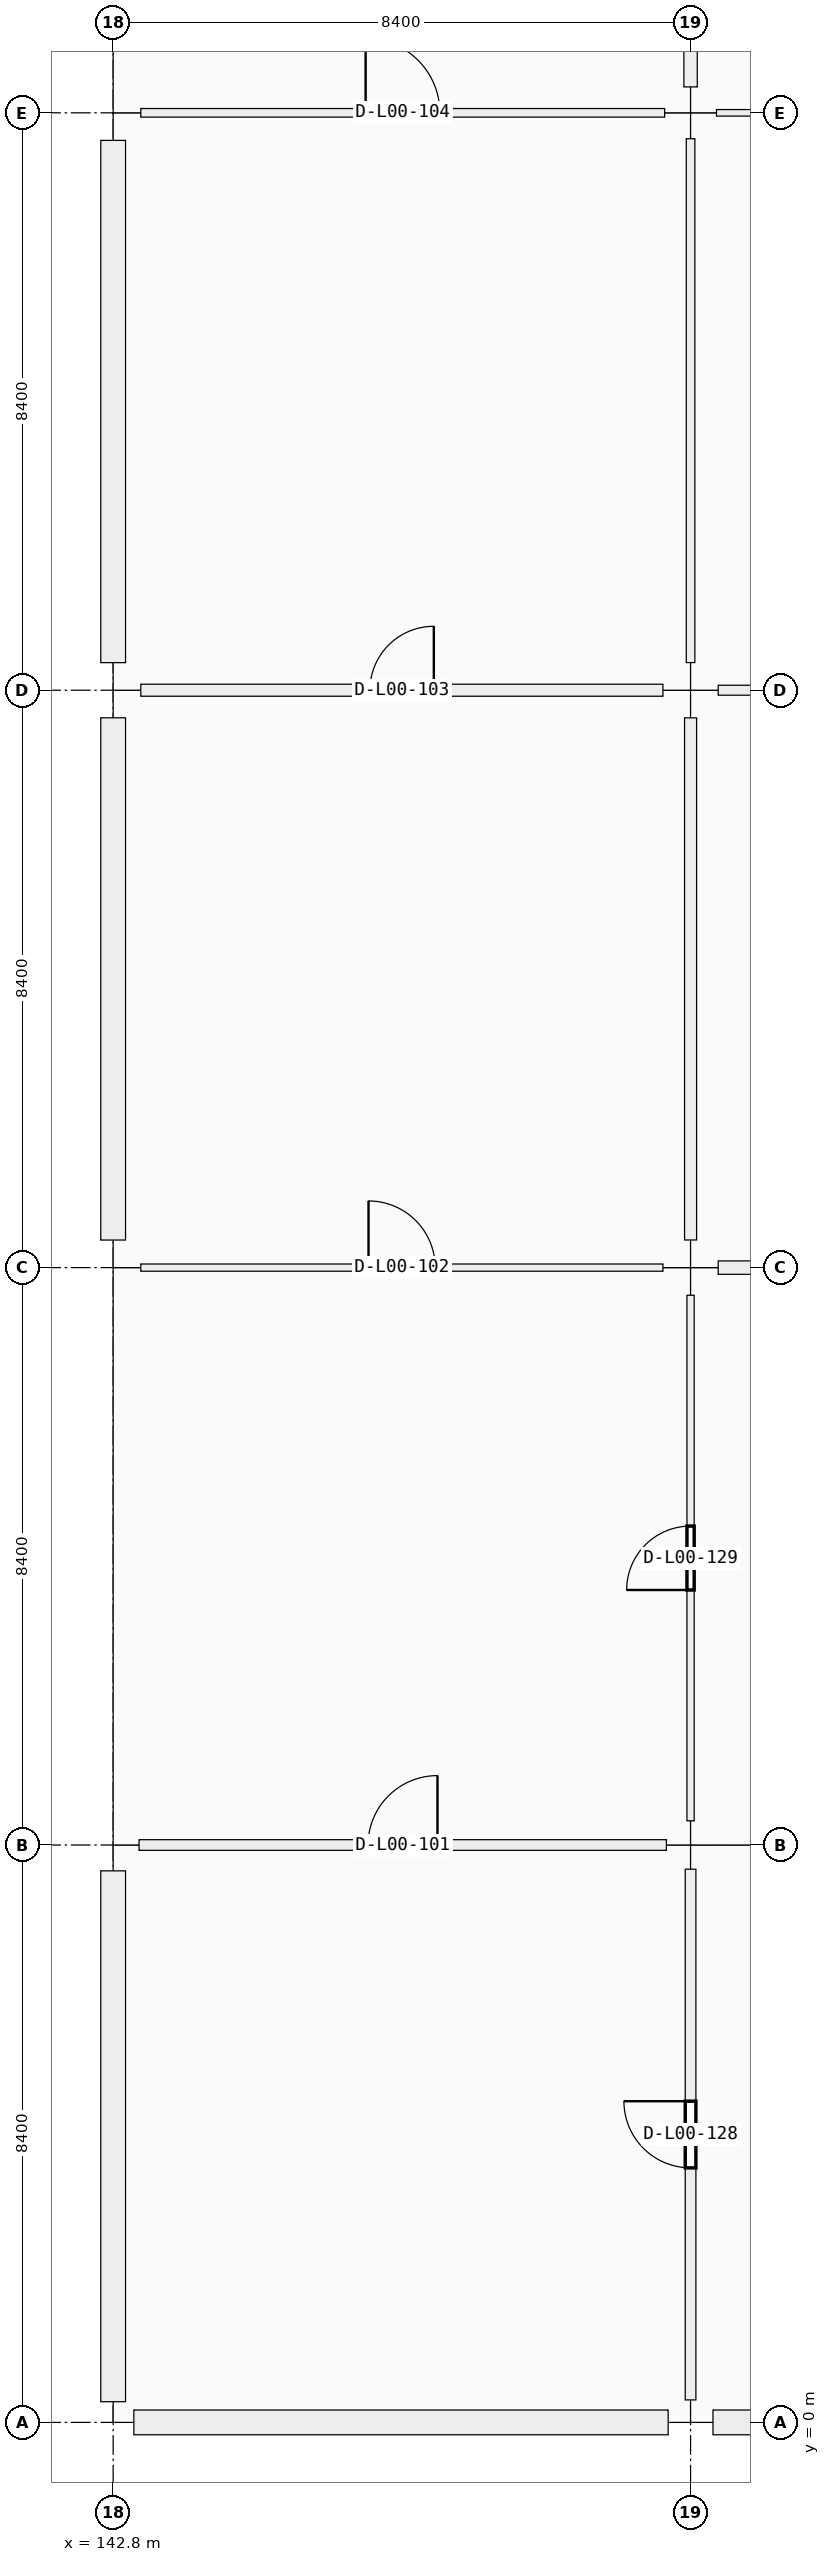
"""IFC4 building model, lengths in metres.
Left out: names, types, materials, properties, quantities, classifications, styles, units other than length and angle.
Written with IfcOpenShell. Run it as: python <this file> out.ifc"""

import sys

from ifc_helpers import new_model, si_unit, direction, frame, frame_2d, origin, origin_2d, place, context, subcontext, project, spatial, rectangle, extrude, element, fill, save


model = new_model("IFC4")
c1 = context("Model", 3, precision=1e-05, world=origin(), true_north=direction((0.0, 1.0)))
c2 = subcontext(c1, "Body", "Model", "MODEL_VIEW")
j1 = project(units=[si_unit("LENGTHUNIT", "METRE"), si_unit("PLANEANGLEUNIT", "RADIAN")], contexts=[c1])
p1 = place(None, origin())
s1 = spatial("IfcSite", under=j1, at=p1, CompositionType="ELEMENT")
p2 = place(p1, origin())
s2 = spatial("IfcBuilding", under=s1, at=p2, CompositionType="ELEMENT")
p3 = place(p2, origin())
s3 = spatial("IfcBuildingStorey", under=s2, at=p3, CompositionType="ELEMENT", Elevation=0.0)
p4 = place(p3, frame((142.8, 0.0, 0.0), z_axis=(0.0, 0.0, 1.0), x_axis=(1.0, 0.0, 0.0)))
e1 = element("IfcColumn", 1, at=p4, inside=s3, PredefinedType="COLUMN", context=c2, shape_type="SweptSolid", body=[
    extrude(rectangle(XDim=0.6, YDim=0.6, at=origin_2d()), origin(), (0.0, 0.0, 1.0), 5.76),
])
p5 = place(p3, frame((142.8, 8.4, 0.0), z_axis=(0.0, 0.0, 1.0), x_axis=(1.0, 0.0, 0.0)))
e2 = element("IfcColumn", 2, at=p5, inside=s3, PredefinedType="COLUMN", context=c2, shape_type="SweptSolid", body=[
    extrude(rectangle(XDim=0.75, YDim=0.75, at=origin_2d()), origin(), (0.0, 0.0, 1.0), 5.76),
])
for number, where, z_axis, x_axis in (
    (3, (142.8, 16.8, 0.0), (0.0, 0.0, 1.0), (1.0, 0.0, 0.0)),
    (4, (142.8, 25.2, 0.0), (0.0, 0.0, 1.0), (1.0, 0.0, 0.0)),
    (5, (142.8, 33.6, 0.0), (0.0, 0.0, 1.0), (1.0, 0.0, 0.0)),
):
    element("IfcColumn", number, at=place(p3, frame(where, z_axis=z_axis, x_axis=x_axis)), inside=s3, PredefinedType="COLUMN", context=c2, shape_type="SweptSolid", body=[
        extrude(rectangle(XDim=0.8, YDim=0.8, at=origin_2d()), origin(), (0.0, 0.0, 1.0), 5.76),
    ])
p6 = place(p3, frame((151.2, 0.0, 0.0), z_axis=(0.0, 0.0, 1.0), x_axis=(1.0, 0.0, 0.0)))
e6 = element("IfcColumn", 6, at=p6, inside=s3, PredefinedType="COLUMN", context=c2, shape_type="SweptSolid", body=[
    extrude(rectangle(XDim=0.65, YDim=0.65, at=origin_2d()), origin(), (0.0, 0.0, 1.0), 5.76),
])
p7 = place(p3, frame((151.2, 8.4, 0.0), z_axis=(0.0, 0.0, 1.0), x_axis=(1.0, 0.0, 0.0)))
e7 = element("IfcColumn", 7, at=p7, inside=s3, PredefinedType="COLUMN", context=c2, shape_type="SweptSolid", body=[
    extrude(rectangle(XDim=0.7, YDim=0.7, at=origin_2d()), origin(), (0.0, 0.0, 1.0), 5.76),
])
for number, where, z_axis, x_axis in (
    (8, (151.2, 16.8, 0.0), (0.0, 0.0, 1.0), (1.0, 0.0, 0.0)),
    (9, (151.2, 25.2, 0.0), (0.0, 0.0, 1.0), (1.0, 0.0, 0.0)),
):
    element("IfcColumn", number, at=place(p3, frame(where, z_axis=z_axis, x_axis=x_axis)), inside=s3, PredefinedType="COLUMN", context=c2, shape_type="SweptSolid", body=[
        extrude(rectangle(XDim=0.8, YDim=0.8, at=origin_2d()), origin(), (0.0, 0.0, 1.0), 5.76),
    ])
p8 = place(p3, frame((151.2, 33.6, 0.0), z_axis=(0.0, 0.0, 1.0), x_axis=(1.0, 0.0, 0.0)))
e10 = element("IfcColumn", 10, at=p8, inside=s3, PredefinedType="COLUMN", context=c2, shape_type="SweptSolid", body=[
    extrude(rectangle(XDim=0.75, YDim=0.75, at=origin_2d()), origin(), (0.0, 0.0, 1.0), 5.51),
])
p9 = place(p3, frame((150.874, 0.0, 0.0), z_axis=(0.0, 0.0, 1.0), x_axis=(-1.0, 0.0, 0.0)))
e11 = element("IfcWall", 11, at=p9, inside=s3, PredefinedType="SOLIDWALL", context=c2, shape_type="SweptSolid", body=[
    extrude(rectangle(XDim=7.773, YDim=0.36, at=frame_2d((3.886, 0.0))), origin(), (0.0, 0.0, 1.0), 4.7),
])
p10 = place(p9, frame((2.712, 0.0, 0.9)))
e12 = element("IfcOpeningElement", 12, at=p10, cuts=e11, PredefinedType="OPENING", context=c2, shape_type="SweptSolid", body=[
    extrude(rectangle(XDim=2.35, YDim=1.6, at=frame_2d((1.175, 0.8))), frame((0.0, 0.18, 0.0), z_axis=(0.0, -1.0, 0.0), x_axis=(1.0, 0.0, 0.0)), (0.0, 0.0, 1.0), 0.36),
])
p11 = place(p3, frame((142.8, 0.301, 0.0), z_axis=(0.0, 0.0, 1.0), x_axis=(0.0, 1.0, 0.0)))
e13 = element("IfcWall", 13, at=p11, inside=s3, PredefinedType="SOLIDWALL", context=c2, shape_type="SweptSolid", body=[
    extrude(rectangle(XDim=7.723, YDim=0.36, at=frame_2d((3.861, 0.0))), origin(), (0.0, 0.0, 1.0), 4.7),
])
p12 = place(p11, frame((2.486, 0.0, 0.9)))
e14 = element("IfcOpeningElement", 14, at=p12, cuts=e13, PredefinedType="OPENING", context=c2, shape_type="SweptSolid", body=[
    extrude(rectangle(XDim=2.75, YDim=1.6, at=frame_2d((1.375, 0.8))), frame((0.0, 0.18, 0.0), z_axis=(0.0, -1.0, 0.0), x_axis=(1.0, 0.0, 0.0)), (0.0, 0.0, 1.0), 0.36),
])
p13 = place(p3, frame((142.8, 17.201, 0.0), z_axis=(0.0, 0.0, 1.0), x_axis=(0.0, 1.0, 0.0)))
e15 = element("IfcWall", 15, at=p13, inside=s3, PredefinedType="SOLIDWALL", context=c2, shape_type="SweptSolid", body=[
    extrude(rectangle(XDim=7.598, YDim=0.36, at=frame_2d((3.799, 0.0))), origin(), (0.0, 0.0, 1.0), 4.7),
])
p14 = place(p13, frame((3.024, 0.0, 0.9)))
e16 = element("IfcOpeningElement", 16, at=p14, cuts=e15, PredefinedType="OPENING", context=c2, shape_type="SweptSolid", body=[
    extrude(rectangle(XDim=1.55, YDim=1.6, at=frame_2d((0.775, 0.8))), frame((0.0, 0.18, 0.0), z_axis=(0.0, -1.0, 0.0), x_axis=(1.0, 0.0, 0.0)), (0.0, 0.0, 1.0), 0.36),
])
p15 = place(p3, frame((142.8, 25.601, 0.0), z_axis=(0.0, 0.0, 1.0), x_axis=(0.0, 1.0, 0.0)))
e17 = element("IfcWall", 17, at=p15, inside=s3, PredefinedType="SOLIDWALL", context=c2, shape_type="SweptSolid", body=[
    extrude(rectangle(XDim=7.598, YDim=0.36, at=frame_2d((3.799, 0.0))), origin(), (0.0, 0.0, 1.0), 4.7),
])
p16 = place(p15, frame((2.774, 0.0, 0.9)))
e18 = element("IfcOpeningElement", 18, at=p16, cuts=e17, PredefinedType="OPENING", context=c2, shape_type="SweptSolid", body=[
    extrude(rectangle(XDim=2.05, YDim=1.45, at=frame_2d((1.025, 0.725))), frame((0.0, 0.18, 0.0), z_axis=(0.0, -1.0, 0.0), x_axis=(1.0, 0.0, 0.0)), (0.0, 0.0, 1.0), 0.36),
])
p17 = place(p3, frame((159.299, 0.0, 0.0), z_axis=(0.0, 0.0, 1.0), x_axis=(-1.0, 0.0, 0.0)))
e19 = element("IfcWall", 19, at=p17, inside=s3, PredefinedType="SOLIDWALL", context=c2, shape_type="SweptSolid", body=[
    extrude(rectangle(XDim=7.773, YDim=0.36, at=frame_2d((3.887, 0.0))), origin(), (0.0, 0.0, 1.0), 4.7),
])
p18 = place(p17, frame((2.736, 0.0, 0.0)))
e20 = element("IfcOpeningElement", 20, at=p18, cuts=e19, PredefinedType="OPENING", context=c2, shape_type="SweptSolid", body=[
    extrude(rectangle(XDim=2.3, YDim=2.3, at=frame_2d((1.15, 1.15))), frame((0.0, 0.18, 0.0), z_axis=(0.0, -1.0, 0.0), x_axis=(1.0, 0.0, 0.0)), (0.0, 0.0, 1.0), 0.36),
])
p19 = place(p3, frame((143.177, 8.4, 0.0), z_axis=(0.0, 0.0, 1.0), x_axis=(1.0, 0.0, 0.0)))
e21 = element("IfcWall", 21, at=p19, inside=s3, PredefinedType="PARTITIONING", context=c2, shape_type="SweptSolid", body=[
    extrude(rectangle(XDim=7.671, YDim=0.155, at=frame_2d((3.835, 0.0))), origin(), (0.0, 0.0, 1.0), 3.66),
])
p20 = place(p19, frame((3.331, 0.0, 0.0)))
e22 = element("IfcOpeningElement", 22, at=p20, cuts=e21, PredefinedType="OPENING", context=c2, shape_type="SweptSolid", body=[
    extrude(rectangle(XDim=1.01, YDim=2.12, at=frame_2d((0.505, 1.06))), frame((0.0, 0.078, 0.0), z_axis=(0.0, -1.0, 0.0), x_axis=(1.0, 0.0, 0.0)), (0.0, 0.0, 1.0), 0.155),
])
p21 = place(p3, frame((143.202, 16.8, 0.0), z_axis=(0.0, 0.0, 1.0), x_axis=(1.0, 0.0, 0.0)))
e23 = element("IfcWall", 23, at=p21, inside=s3, PredefinedType="PARTITIONING", context=c2, shape_type="SweptSolid", body=[
    extrude(rectangle(XDim=7.596, YDim=0.105, at=frame_2d((3.798, 0.0))), origin(), (0.0, 0.0, 1.0), 3.66),
])
p22 = place(p21, frame((3.313, 0.0, 0.0)))
e24 = element("IfcOpeningElement", 24, at=p22, cuts=e23, PredefinedType="OPENING", context=c2, shape_type="SweptSolid", body=[
    extrude(rectangle(XDim=0.97, YDim=2.12, at=frame_2d((0.485, 1.06))), frame((0.0, 0.052, 0.0), z_axis=(0.0, -1.0, 0.0), x_axis=(1.0, 0.0, 0.0)), (0.0, 0.0, 1.0), 0.105),
])
p23 = place(p3, frame((143.202, 25.2, 0.0), z_axis=(0.0, 0.0, 1.0), x_axis=(1.0, 0.0, 0.0)))
e25 = element("IfcWall", 25, at=p23, inside=s3, PredefinedType="PARTITIONING", context=c2, shape_type="SweptSolid", body=[
    extrude(rectangle(XDim=7.596, YDim=0.175, at=frame_2d((3.798, 0.0))), origin(), (0.0, 0.0, 1.0), 3.66),
])
p24 = place(p23, frame((3.333, 0.0, 0.0)))
e26 = element("IfcOpeningElement", 26, at=p24, cuts=e25, PredefinedType="OPENING", context=c2, shape_type="SweptSolid", body=[
    extrude(rectangle(XDim=0.93, YDim=2.12, at=frame_2d((0.465, 1.06))), frame((0.0, 0.087, 0.0), z_axis=(0.0, -1.0, 0.0), x_axis=(1.0, 0.0, 0.0)), (0.0, 0.0, 1.0), 0.175),
])
p25 = place(p3, frame((143.202, 33.6, 0.0), z_axis=(0.0, 0.0, 1.0), x_axis=(1.0, 0.0, 0.0)))
e27 = element("IfcWall", 27, at=p25, inside=s3, PredefinedType="PARTITIONING", context=c2, shape_type="SweptSolid", body=[
    extrude(rectangle(XDim=7.621, YDim=0.125, at=frame_2d((3.811, 0.0))), origin(), (0.0, 0.0, 1.0), 3.66),
])
p26 = place(p25, frame((3.271, 0.0, 0.0)))
e28 = element("IfcOpeningElement", 28, at=p26, cuts=e27, PredefinedType="OPENING", context=c2, shape_type="SweptSolid", body=[
    extrude(rectangle(XDim=1.08, YDim=2.25, at=frame_2d((0.54, 1.125))), frame((0.0, 0.062, 0.0), z_axis=(0.0, -1.0, 0.0), x_axis=(1.0, 0.0, 0.0)), (0.0, 0.0, 1.0), 0.125),
])
p27 = place(p3, frame((151.602, 16.8, 0.0), z_axis=(0.0, 0.0, 1.0), x_axis=(1.0, 0.0, 0.0)))
e29 = element("IfcWall", 29, at=p27, inside=s3, PredefinedType="PARTITIONING", context=c2, shape_type="SweptSolid", body=[
    extrude(rectangle(XDim=7.596, YDim=0.195, at=frame_2d((3.798, 0.0))), origin(), (0.0, 0.0, 1.0), 3.66),
])
p28 = place(p27, frame((3.288, 0.0, 0.0)))
e30 = element("IfcOpeningElement", 30, at=p28, cuts=e29, PredefinedType="OPENING", context=c2, shape_type="SweptSolid", body=[
    extrude(rectangle(XDim=1.02, YDim=2.2, at=frame_2d((0.51, 1.1))), frame((0.0, 0.098, 0.0), z_axis=(0.0, -1.0, 0.0), x_axis=(1.0, 0.0, 0.0)), (0.0, 0.0, 1.0), 0.195),
])
p29 = place(p3, frame((151.602, 25.2, 0.0), z_axis=(0.0, 0.0, 1.0), x_axis=(1.0, 0.0, 0.0)))
e31 = element("IfcWall", 31, at=p29, inside=s3, PredefinedType="PARTITIONING", context=c2, shape_type="SweptSolid", body=[
    extrude(rectangle(XDim=7.596, YDim=0.145, at=frame_2d((3.798, 0.0))), origin(), (0.0, 0.0, 1.0), 3.66),
])
p30 = place(p29, frame((3.278, 0.0, 0.0)))
e32 = element("IfcOpeningElement", 32, at=p30, cuts=e31, PredefinedType="OPENING", context=c2, shape_type="SweptSolid", body=[
    extrude(rectangle(XDim=1.04, YDim=2.2, at=frame_2d((0.52, 1.1))), frame((0.0, 0.073, 0.0), z_axis=(0.0, -1.0, 0.0), x_axis=(1.0, 0.0, 0.0)), (0.0, 0.0, 1.0), 0.145),
])
p31 = place(p3, frame((151.577, 33.6, 0.0), z_axis=(0.0, 0.0, 1.0), x_axis=(1.0, 0.0, 0.0)))
e33 = element("IfcWall", 33, at=p31, inside=s3, PredefinedType="PARTITIONING", context=c2, shape_type="SweptSolid", body=[
    extrude(rectangle(XDim=7.621, YDim=0.095, at=frame_2d((3.811, 0.0))), origin(), (0.0, 0.0, 1.0), 3.66),
])
p32 = place(p31, frame((3.311, 0.0, 0.0)))
e34 = element("IfcOpeningElement", 34, at=p32, cuts=e33, PredefinedType="OPENING", context=c2, shape_type="SweptSolid", body=[
    extrude(rectangle(XDim=1.0, YDim=2.2, at=frame_2d((0.5, 1.1))), frame((0.0, 0.047, 0.0), z_axis=(0.0, -1.0, 0.0), x_axis=(1.0, 0.0, 0.0)), (0.0, 0.0, 1.0), 0.095),
])
p33 = place(p3, frame((151.2, 0.327, 0.0), z_axis=(0.0, 0.0, 1.0), x_axis=(0.0, 1.0, 0.0)))
e35 = element("IfcWall", 35, at=p33, inside=s3, PredefinedType="PARTITIONING", context=c2, shape_type="SweptSolid", body=[
    extrude(rectangle(XDim=7.721, YDim=0.155, at=frame_2d((3.861, 0.0))), origin(), (0.0, 0.0, 1.0), 3.66),
])
p34 = place(p33, frame((3.376, 0.0, 0.0)))
e36 = element("IfcOpeningElement", 36, at=p34, cuts=e35, PredefinedType="OPENING", context=c2, shape_type="SweptSolid", body=[
    extrude(rectangle(XDim=0.97, YDim=2.12, at=frame_2d((0.485, 1.06))), frame((0.0, 0.078, 0.0), z_axis=(0.0, -1.0, 0.0), x_axis=(1.0, 0.0, 0.0)), (0.0, 0.0, 1.0), 0.155),
])
p35 = place(p3, frame((151.2, 8.752, 0.0), z_axis=(0.0, 0.0, 1.0), x_axis=(0.0, 1.0, 0.0)))
e37 = element("IfcWall", 37, at=p35, inside=s3, PredefinedType="PARTITIONING", context=c2, shape_type="SweptSolid", body=[
    extrude(rectangle(XDim=7.646, YDim=0.105, at=frame_2d((3.823, 0.0))), origin(), (0.0, 0.0, 1.0), 3.66),
])
p36 = place(p35, frame((3.358, 0.0, 0.0)))
e38 = element("IfcOpeningElement", 38, at=p36, cuts=e37, PredefinedType="OPENING", context=c2, shape_type="SweptSolid", body=[
    extrude(rectangle(XDim=0.93, YDim=2.12, at=frame_2d((0.465, 1.06))), frame((0.0, 0.052, 0.0), z_axis=(0.0, -1.0, 0.0), x_axis=(1.0, 0.0, 0.0)), (0.0, 0.0, 1.0), 0.105),
])
p37 = place(p3, frame((151.2, 17.202, 0.0), z_axis=(0.0, 0.0, 1.0), x_axis=(0.0, 1.0, 0.0)))
e39 = element("IfcWall", 39, at=p37, inside=s3, PredefinedType="PARTITIONING", context=c2, shape_type="SweptSolid", body=[
    extrude(rectangle(XDim=7.596, YDim=0.175, at=frame_2d((3.798, 0.0))), origin(), (0.0, 0.0, 1.0), 3.66),
])
p38 = place(p37, frame((3.278, 0.0, 0.0)))
e40 = element("IfcOpeningElement", 40, at=p38, cuts=e39, PredefinedType="OPENING", context=c2, shape_type="SweptSolid", body=[
    extrude(rectangle(XDim=1.04, YDim=2.2, at=frame_2d((0.52, 1.1))), frame((0.0, 0.087, 0.0), z_axis=(0.0, -1.0, 0.0), x_axis=(1.0, 0.0, 0.0)), (0.0, 0.0, 1.0), 0.175),
])
p39 = place(p3, frame((151.2, 25.602, 0.0), z_axis=(0.0, 0.0, 1.0), x_axis=(0.0, 1.0, 0.0)))
e41 = element("IfcWall", 41, at=p39, inside=s3, PredefinedType="PARTITIONING", context=c2, shape_type="SweptSolid", body=[
    extrude(rectangle(XDim=7.621, YDim=0.125, at=frame_2d((3.811, 0.0))), origin(), (0.0, 0.0, 1.0), 3.66),
])
p40 = place(p39, frame((3.301, 0.0, 0.0)))
e42 = element("IfcOpeningElement", 42, at=p40, cuts=e41, PredefinedType="OPENING", context=c2, shape_type="SweptSolid", body=[
    extrude(rectangle(XDim=1.02, YDim=2.2, at=frame_2d((0.51, 1.1))), frame((0.0, 0.062, 0.0), z_axis=(0.0, -1.0, 0.0), x_axis=(1.0, 0.0, 0.0)), (0.0, 0.0, 1.0), 0.125),
])
p41 = place(p3, frame((151.2, 33.977, 0.0), z_axis=(0.0, 0.0, 1.0), x_axis=(0.0, 1.0, 0.0)))
e43 = element("IfcWall", 43, at=p41, inside=s3, PredefinedType="PARTITIONING", context=c2, shape_type="SweptSolid", body=[
    extrude(rectangle(XDim=7.671, YDim=0.195, at=frame_2d((3.835, 0.0))), origin(), (0.0, 0.0, 1.0), 3.66),
])
p42 = place(p41, frame((3.336, 0.0, 0.0)))
e44 = element("IfcOpeningElement", 44, at=p42, cuts=e43, PredefinedType="OPENING", context=c2, shape_type="SweptSolid", body=[
    extrude(rectangle(XDim=1.0, YDim=2.2, at=frame_2d((0.5, 1.1))), frame((0.0, 0.098, 0.0), z_axis=(0.0, -1.0, 0.0), x_axis=(1.0, 0.0, 0.0)), (0.0, 0.0, 1.0), 0.195),
])
p43 = place(p10, origin())
e45 = element("IfcWindow", 45, at=p43, inside=s3, PartitioningType="SINGLE_PANEL", PredefinedType="WINDOW", context=c2, shape_type="SweptSolid", body=[
    extrude(rectangle(XDim=2.35, YDim=1.6, at=frame_2d((1.175, 0.8))), frame((0.0, 0.03, 0.0), z_axis=(0.0, -1.0, 0.0), x_axis=(1.0, 0.0, 0.0)), (0.0, 0.0, 1.0), 0.06),
])
fill(e12, e45)
p44 = place(p12, origin())
e46 = element("IfcWindow", 46, at=p44, inside=s3, PartitioningType="SINGLE_PANEL", PredefinedType="WINDOW", context=c2, shape_type="SweptSolid", body=[
    extrude(rectangle(XDim=2.75, YDim=1.6, at=frame_2d((1.375, 0.8))), frame((0.0, 0.03, 0.0), z_axis=(0.0, -1.0, 0.0), x_axis=(1.0, 0.0, 0.0)), (0.0, 0.0, 1.0), 0.06),
])
fill(e14, e46)
p45 = place(p14, origin())
e47 = element("IfcWindow", 47, at=p45, inside=s3, PartitioningType="SINGLE_PANEL", PredefinedType="WINDOW", context=c2, shape_type="SweptSolid", body=[
    extrude(rectangle(XDim=1.55, YDim=1.6, at=frame_2d((0.775, 0.8))), frame((0.0, 0.03, 0.0), z_axis=(0.0, -1.0, 0.0), x_axis=(1.0, 0.0, 0.0)), (0.0, 0.0, 1.0), 0.06),
])
fill(e16, e47)
p46 = place(p16, origin())
e48 = element("IfcWindow", 48, at=p46, inside=s3, PartitioningType="SINGLE_PANEL", PredefinedType="WINDOW", context=c2, shape_type="SweptSolid", body=[
    extrude(rectangle(XDim=2.05, YDim=1.45, at=frame_2d((1.025, 0.725))), frame((0.0, 0.03, 0.0), z_axis=(0.0, -1.0, 0.0), x_axis=(1.0, 0.0, 0.0)), (0.0, 0.0, 1.0), 0.06),
])
fill(e18, e48)
p47 = place(p20, origin())
e49 = element("IfcDoor", 49, at=p47, inside=s3, OperationType="SINGLE_SWING_RIGHT", PredefinedType="DOOR", context=c2, shape_type="SweptSolid", body=[
    extrude(rectangle(XDim=1.01, YDim=2.12, at=frame_2d((0.505, 1.06))), frame((0.0, 0.025, 0.0), z_axis=(0.0, -1.0, 0.0), x_axis=(1.0, 0.0, 0.0)), (0.0, 0.0, 1.0), 0.05),
])
fill(e22, e49)
p48 = place(p22, origin())
e50 = element("IfcDoor", 50, at=p48, inside=s3, OperationType="SINGLE_SWING_LEFT", PredefinedType="DOOR", context=c2, shape_type="SweptSolid", body=[
    extrude(rectangle(XDim=0.97, YDim=2.12, at=frame_2d((0.485, 1.06))), frame((0.0, 0.025, 0.0), z_axis=(0.0, -1.0, 0.0), x_axis=(1.0, 0.0, 0.0)), (0.0, 0.0, 1.0), 0.05),
])
fill(e24, e50)
p49 = place(p24, origin())
e51 = element("IfcDoor", 51, at=p49, inside=s3, OperationType="SINGLE_SWING_RIGHT", PredefinedType="DOOR", context=c2, shape_type="SweptSolid", body=[
    extrude(rectangle(XDim=0.93, YDim=2.12, at=frame_2d((0.465, 1.06))), frame((0.0, 0.025, 0.0), z_axis=(0.0, -1.0, 0.0), x_axis=(1.0, 0.0, 0.0)), (0.0, 0.0, 1.0), 0.05),
])
fill(e26, e51)
p50 = place(p26, origin())
e52 = element("IfcDoor", 52, at=p50, inside=s3, OperationType="SINGLE_SWING_LEFT", PredefinedType="DOOR", context=c2, shape_type="SweptSolid", body=[
    extrude(rectangle(XDim=1.08, YDim=2.25, at=frame_2d((0.54, 1.125))), frame((0.0, 0.025, 0.0), z_axis=(0.0, -1.0, 0.0), x_axis=(1.0, 0.0, 0.0)), (0.0, 0.0, 1.0), 0.05),
])
fill(e28, e52)
p51 = place(p34, origin())
e53 = element("IfcDoor", 53, at=p51, inside=s3, OperationType="SINGLE_SWING_RIGHT", PredefinedType="DOOR", context=c2, shape_type="SweptSolid", body=[
    extrude(rectangle(XDim=0.97, YDim=2.12, at=frame_2d((0.485, 1.06))), frame((0.0, 0.025, 0.0), z_axis=(0.0, -1.0, 0.0), x_axis=(1.0, 0.0, 0.0)), (0.0, 0.0, 1.0), 0.05),
])
fill(e36, e53)
p52 = place(p36, origin())
e54 = element("IfcDoor", 54, at=p52, inside=s3, OperationType="SINGLE_SWING_LEFT", PredefinedType="DOOR", context=c2, shape_type="SweptSolid", body=[
    extrude(rectangle(XDim=0.93, YDim=2.12, at=frame_2d((0.465, 1.06))), frame((0.0, 0.025, 0.0), z_axis=(0.0, -1.0, 0.0), x_axis=(1.0, 0.0, 0.0)), (0.0, 0.0, 1.0), 0.05),
])
fill(e38, e54)
p53 = place(p38, origin())
e55 = element("IfcDoor", 55, at=p53, inside=s3, OperationType="SINGLE_SWING_RIGHT", PredefinedType="DOOR", context=c2, shape_type="SweptSolid", body=[
    extrude(rectangle(XDim=1.04, YDim=2.2, at=frame_2d((0.52, 1.1))), frame((0.0, 0.025, 0.0), z_axis=(0.0, -1.0, 0.0), x_axis=(1.0, 0.0, 0.0)), (0.0, 0.0, 1.0), 0.05),
])
fill(e40, e55)
p54 = place(p40, origin())
e56 = element("IfcDoor", 56, at=p54, inside=s3, OperationType="SINGLE_SWING_LEFT", PredefinedType="DOOR", context=c2, shape_type="SweptSolid", body=[
    extrude(rectangle(XDim=1.02, YDim=2.2, at=frame_2d((0.51, 1.1))), frame((0.0, 0.025, 0.0), z_axis=(0.0, -1.0, 0.0), x_axis=(1.0, 0.0, 0.0)), (0.0, 0.0, 1.0), 0.05),
])
fill(e42, e56)
save(model, sys.argv[1])
